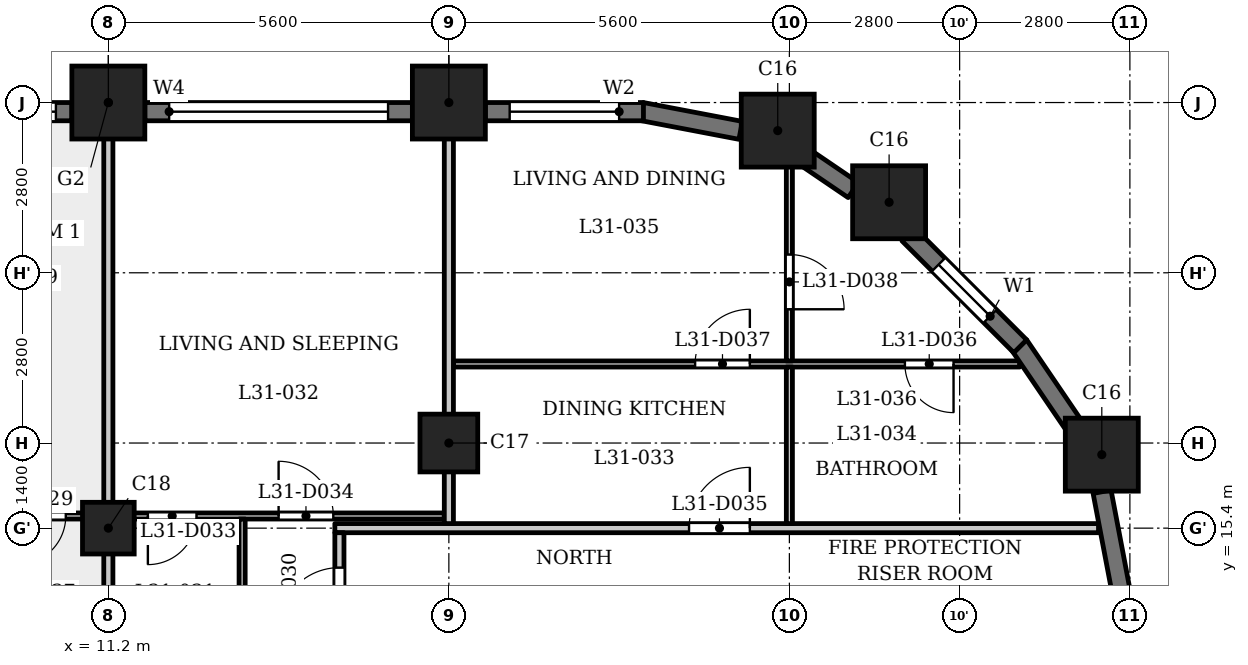
"""IFC4 building model, lengths in metres.
Left out: names, types, materials, properties, quantities, classifications, styles, units other than length and angle.
Written with IfcOpenShell. Run it as: python <this file> out.ifc"""

import sys

from ifc_helpers import new_model, si_unit, direction, frame, frame_2d, origin, origin_2d, place, context, subcontext, project, spatial, rectangle, extrude, element, fill, save


model = new_model("IFC4")
c1 = context("Model", 3, precision=1e-05, world=origin(), true_north=direction((0.0, 1.0)))
c2 = subcontext(c1, "Body", "Model", "MODEL_VIEW")
j1 = project(units=[si_unit("LENGTHUNIT", "METRE"), si_unit("PLANEANGLEUNIT", "RADIAN")], contexts=[c1])
p1 = place(None, origin())
s1 = spatial("IfcSite", under=j1, at=p1, CompositionType="ELEMENT")
p2 = place(p1, origin())
s2 = spatial("IfcBuilding", under=s1, at=p2, CompositionType="ELEMENT")
p3 = place(p2, frame((0.0, 0.0, 121.8)))
s3 = spatial("IfcBuildingStorey", under=s2, at=p3, CompositionType="ELEMENT", Elevation=121.8)
for number, where, z_axis, x_axis in (
    (1, (27.538, 16.609, 0.0), (0.0, 0.0, 1.0), (1.0, 0.0, 0.0)),
    (2, (24.04, 20.76, 0.0), (0.0, 0.0, 1.0), (1.0, 0.0, 0.0)),
    (3, (22.209, 21.938, 0.0), (0.0, 0.0, 1.0), (1.0, 0.0, 0.0)),
    (4, (16.8, 22.4, 0.0), (0.0, 0.0, 1.0), (1.0, 0.0, 0.0)),
    (5, (11.2, 22.4, 0.0), (0.0, 0.0, 1.0), (1.0, 0.0, 0.0)),
):
    element("IfcColumn", number, at=place(p3, frame(where, z_axis=z_axis, x_axis=x_axis)), inside=s3, PredefinedType="COLUMN", context=c2, shape_type="SweptSolid", body=[
        extrude(rectangle(XDim=1.2, YDim=1.2, at=origin_2d()), origin(), (0.0, 0.0, 1.0), 3.5),
    ])
p4 = place(p3, frame((16.8, 16.8, 0.0), z_axis=(0.0, 0.0, 1.0), x_axis=(1.0, 0.0, 0.0)))
e6 = element("IfcColumn", 6, at=p4, inside=s3, PredefinedType="COLUMN", context=c2, shape_type="SweptSolid", body=[
    extrude(rectangle(XDim=0.95, YDim=0.95, at=origin_2d()), origin(), (0.0, 0.0, 1.0), 3.5),
])
p5 = place(p3, frame((11.2, 15.4, 0.0), z_axis=(0.0, 0.0, 1.0), x_axis=(1.0, 0.0, 0.0)))
e7 = element("IfcColumn", 7, at=p5, inside=s3, PredefinedType="COLUMN", context=c2, shape_type="SweptSolid", body=[
    extrude(rectangle(XDim=0.85, YDim=0.85, at=origin_2d()), origin(), (0.0, 0.0, 1.0), 3.5),
])
for number, where, z_axis, x_axis in (
    (8, (27.853, 14.372, 0.0), (0.0, 0.0, 1.0), (-0.187, 0.982, 0.0)),
    (9, (27.11, 17.043, 0.0), (0.0, 0.0, 1.0), (-0.562, 0.827, 0.0)),
):
    element("IfcWall", number, at=place(p3, frame(where, z_axis=z_axis, x_axis=x_axis)), inside=s3, PredefinedType="SOLIDWALL", context=c2, shape_type="SweptSolid", body=[
        extrude(rectangle(XDim=1.656, YDim=0.3, at=frame_2d((0.828, 0.0))), origin(), (0.0, 0.0, 1.0), 2.35),
    ])
p6 = place(p3, frame((26.197, 18.391, 0.0), z_axis=(0.0, 0.0, 1.0), x_axis=(-0.707059830104, 0.707153729152, 0.0)))
e10 = element("IfcWall", 10, at=p6, inside=s3, PredefinedType="SOLIDWALL", context=c2, shape_type="SweptSolid", body=[
    extrude(rectangle(XDim=2.6, YDim=0.3, at=frame_2d((1.3, 0.0))), origin(), (0.0, 0.0, 1.0), 2.35),
])
p7 = place(p6, frame((0.7, 0.0, 0.6)))
e11 = element("IfcOpeningElement", 11, at=p7, cuts=e10, PredefinedType="OPENING", context=c2, shape_type="SweptSolid", body=[
    extrude(rectangle(XDim=1.2, YDim=1.55, at=frame_2d((0.6, 0.775))), frame((0.0, 0.16, 0.0), z_axis=(0.0, -1.0, 0.0), x_axis=(1.0, 0.0, 0.0)), (0.0, 0.0, 1.0), 0.32),
])
p8 = place(p3, frame((23.451, 20.96, 0.0), z_axis=(0.0, 0.0, 1.0), x_axis=(-0.827019434577, 0.562173331661, 0.0)))
e12 = element("IfcWall", 12, at=p8, inside=s3, PredefinedType="SOLIDWALL", context=c2, shape_type="SweptSolid", body=[
    extrude(rectangle(XDim=0.977, YDim=0.3, at=frame_2d((0.489, 0.0))), origin(), (0.0, 0.0, 1.0), 3.15),
])
p9 = place(p3, frame((21.599, 21.942, 0.0), z_axis=(0.0, 0.0, 1.0), x_axis=(-0.98228820662, 0.187376303559, 0.0)))
e13 = element("IfcWall", 13, at=p9, inside=s3, PredefinedType="SOLIDWALL", context=c2, shape_type="SweptSolid", body=[
    extrude(rectangle(XDim=1.656, YDim=0.3, at=frame_2d((0.828, 0.0))), origin(), (0.0, 0.0, 1.0), 2.35),
])
p10 = place(p3, frame((20.0, 22.25, 0.0), z_axis=(0.0, 0.0, 1.0), x_axis=(-1.0, 0.0, 0.0)))
e14 = element("IfcWall", 14, at=p10, inside=s3, PredefinedType="SOLIDWALL", context=c2, shape_type="SweptSolid", body=[
    extrude(rectangle(XDim=2.6, YDim=0.3, at=frame_2d((1.3, 0.0))), origin(), (0.0, 0.0, 1.0), 2.35),
])
p11 = place(p10, frame((0.4, 0.0, 0.9)))
e15 = element("IfcOpeningElement", 15, at=p11, cuts=e14, PredefinedType="OPENING", context=c2, shape_type="SweptSolid", body=[
    extrude(rectangle(XDim=1.8, YDim=1.25, at=frame_2d((0.9, 0.625))), frame((0.0, 0.16, 0.0), z_axis=(0.0, -1.0, 0.0), x_axis=(1.0, 0.0, 0.0)), (0.0, 0.0, 1.0), 0.32),
])
p12 = place(p3, frame((16.2, 22.25, 0.0), z_axis=(0.0, 0.0, 1.0), x_axis=(-1.0, 0.0, 0.0)))
e16 = element("IfcWall", 16, at=p12, inside=s3, PredefinedType="SOLIDWALL", context=c2, shape_type="SweptSolid", body=[
    extrude(rectangle(XDim=4.4, YDim=0.3, at=frame_2d((2.2, 0.0))), origin(), (0.0, 0.0, 1.0), 2.35),
])
p13 = place(p12, frame((0.4, 0.0, 1.2)))
e17 = element("IfcOpeningElement", 17, at=p13, cuts=e16, PredefinedType="OPENING", context=c2, shape_type="SweptSolid", body=[
    extrude(rectangle(XDim=3.6, YDim=0.95, at=frame_2d((1.8, 0.475))), frame((0.0, 0.16, 0.0), z_axis=(0.0, -1.0, 0.0), x_axis=(1.0, 0.0, 0.0)), (0.0, 0.0, 1.0), 0.32),
])
p14 = place(p3, frame((10.6, 22.25, 0.0), z_axis=(0.0, 0.0, 1.0), x_axis=(-1.0, 0.0, 0.0)))
e18 = element("IfcWall", 18, at=p14, inside=s3, PredefinedType="SOLIDWALL", context=c2, shape_type="SweptSolid", body=[
    extrude(rectangle(XDim=4.4, YDim=0.3, at=frame_2d((2.2, 0.0))), origin(), (0.0, 0.0, 1.0), 2.35),
])
p15 = place(p14, frame((0.262, 0.0, 0.9)))
e19 = element("IfcOpeningElement", 19, at=p15, cuts=e18, PredefinedType="OPENING", context=c2, shape_type="SweptSolid", body=[
    extrude(rectangle(XDim=1.8, YDim=1.25, at=frame_2d((0.9, 0.625))), frame((0.0, 0.16, 0.0), z_axis=(0.0, -1.0, 0.0), x_axis=(1.0, 0.0, 0.0)), (0.0, 0.0, 1.0), 0.32),
])
p16 = place(p14, frame((2.837, 0.0, 0.6)))
e20 = element("IfcOpeningElement", 20, at=p16, cuts=e18, PredefinedType="OPENING", context=c2, shape_type="SweptSolid", body=[
    extrude(rectangle(XDim=1.2, YDim=1.55, at=frame_2d((0.6, 0.775))), frame((0.0, 0.16, 0.0), z_axis=(0.0, -1.0, 0.0), x_axis=(1.0, 0.0, 0.0)), (0.0, 0.0, 1.0), 0.32),
])
p17 = place(p3, frame((14.925, 15.4, 0.0), z_axis=(0.0, 0.0, 1.0), x_axis=(1.0, 0.0, 0.0)))
e21 = element("IfcWall", 21, at=p17, inside=s3, PredefinedType="PARTITIONING", context=c2, shape_type="SweptSolid", body=[
    extrude(rectangle(XDim=12.559, YDim=0.15, at=frame_2d((6.279, 0.0))), origin(), (0.0, 0.0, 1.0), 3.15),
])
p18 = place(p17, frame((5.825, 0.0, 0.0)))
e22 = element("IfcOpeningElement", 22, at=p18, cuts=e21, PredefinedType="OPENING", context=c2, shape_type="SweptSolid", body=[
    extrude(rectangle(XDim=1.0, YDim=2.1, at=frame_2d((0.5, 1.05))), frame((0.0, 0.085, 0.0), z_axis=(0.0, -1.0, 0.0), x_axis=(1.0, 0.0, 0.0)), (0.0, 0.0, 1.0), 0.17),
])
p19 = place(p3, frame((-16.725, 15.6, 0.0), z_axis=(0.0, 0.0, 1.0), x_axis=(1.0, 0.0, 0.0)))
e23 = element("IfcWall", 23, at=p19, inside=s3, PredefinedType="PARTITIONING", context=c2, shape_type="SweptSolid", body=[
    extrude(rectangle(XDim=33.45, YDim=0.1, at=frame_2d((16.725, 0.0))), origin(), (0.0, 0.0, 1.0), 3.15),
])
p20 = place(p19, frame((9.425, 0.0, 0.0)))
e24 = element("IfcOpeningElement", 24, at=p20, cuts=e23, PredefinedType="OPENING", context=c2, shape_type="SweptSolid", body=[
    extrude(rectangle(XDim=0.8, YDim=2.1, at=frame_2d((0.4, 1.05))), frame((0.0, 0.06, 0.0), z_axis=(0.0, -1.0, 0.0), x_axis=(1.0, 0.0, 0.0)), (0.0, 0.0, 1.0), 0.12),
])
p21 = place(p19, frame((6.975, 0.0, 0.0)))
e25 = element("IfcOpeningElement", 25, at=p21, cuts=e23, PredefinedType="OPENING", context=c2, shape_type="SweptSolid", body=[
    extrude(rectangle(XDim=0.9, YDim=2.1, at=frame_2d((0.45, 1.05))), frame((0.0, 0.06, 0.0), z_axis=(0.0, -1.0, 0.0), x_axis=(1.0, 0.0, 0.0)), (0.0, 0.0, 1.0), 0.12),
])
p22 = place(p19, frame((1.875, 0.0, 0.0)))
e26 = element("IfcOpeningElement", 26, at=p22, cuts=e23, PredefinedType="OPENING", context=c2, shape_type="SweptSolid", body=[
    extrude(rectangle(XDim=0.9, YDim=2.1, at=frame_2d((0.45, 1.05))), frame((0.0, 0.06, 0.0), z_axis=(0.0, -1.0, 0.0), x_axis=(1.0, 0.0, 0.0)), (0.0, 0.0, 1.0), 0.12),
])
p23 = place(p19, frame((3.475, 0.0, 0.0)))
e27 = element("IfcOpeningElement", 27, at=p23, cuts=e23, PredefinedType="OPENING", context=c2, shape_type="SweptSolid", body=[
    extrude(rectangle(XDim=0.9, YDim=2.1, at=frame_2d((0.45, 1.05))), frame((0.0, 0.06, 0.0), z_axis=(0.0, -1.0, 0.0), x_axis=(1.0, 0.0, 0.0)), (0.0, 0.0, 1.0), 0.12),
])
p24 = place(p19, frame((11.775, 0.0, 0.0)))
e28 = element("IfcOpeningElement", 28, at=p24, cuts=e23, PredefinedType="OPENING", context=c2, shape_type="SweptSolid", body=[
    extrude(rectangle(XDim=0.8, YDim=2.1, at=frame_2d((0.4, 1.05))), frame((0.0, 0.06, 0.0), z_axis=(0.0, -1.0, 0.0), x_axis=(1.0, 0.0, 0.0)), (0.0, 0.0, 1.0), 0.12),
])
p25 = place(p19, frame((14.175, 0.0, 0.0)))
e29 = element("IfcOpeningElement", 29, at=p25, cuts=e23, PredefinedType="OPENING", context=c2, shape_type="SweptSolid", body=[
    extrude(rectangle(XDim=0.9, YDim=2.1, at=frame_2d((0.45, 1.05))), frame((0.0, 0.06, 0.0), z_axis=(0.0, -1.0, 0.0), x_axis=(1.0, 0.0, 0.0)), (0.0, 0.0, 1.0), 0.12),
])
p26 = place(p19, frame((20.725, 0.0, 0.0)))
e30 = element("IfcOpeningElement", 30, at=p26, cuts=e23, PredefinedType="OPENING", context=c2, shape_type="SweptSolid", body=[
    extrude(rectangle(XDim=0.8, YDim=2.1, at=frame_2d((0.4, 1.05))), frame((0.0, 0.06, 0.0), z_axis=(0.0, -1.0, 0.0), x_axis=(1.0, 0.0, 0.0)), (0.0, 0.0, 1.0), 0.12),
])
p27 = place(p19, frame((18.375, 0.0, 0.0)))
e31 = element("IfcOpeningElement", 31, at=p27, cuts=e23, PredefinedType="OPENING", context=c2, shape_type="SweptSolid", body=[
    extrude(rectangle(XDim=0.9, YDim=2.1, at=frame_2d((0.45, 1.05))), frame((0.0, 0.06, 0.0), z_axis=(0.0, -1.0, 0.0), x_axis=(1.0, 0.0, 0.0)), (0.0, 0.0, 1.0), 0.12),
])
p28 = place(p19, frame((26.425, 0.0, 0.0)))
e32 = element("IfcOpeningElement", 32, at=p28, cuts=e23, PredefinedType="OPENING", context=c2, shape_type="SweptSolid", body=[
    extrude(rectangle(XDim=0.8, YDim=2.1, at=frame_2d((0.4, 1.05))), frame((0.0, 0.06, 0.0), z_axis=(0.0, -1.0, 0.0), x_axis=(1.0, 0.0, 0.0)), (0.0, 0.0, 1.0), 0.12),
])
p29 = place(p19, frame((23.875, 0.0, 0.0)))
e33 = element("IfcOpeningElement", 33, at=p29, cuts=e23, PredefinedType="OPENING", context=c2, shape_type="SweptSolid", body=[
    extrude(rectangle(XDim=0.9, YDim=2.1, at=frame_2d((0.45, 1.05))), frame((0.0, 0.06, 0.0), z_axis=(0.0, -1.0, 0.0), x_axis=(1.0, 0.0, 0.0)), (0.0, 0.0, 1.0), 0.12),
])
p30 = place(p19, frame((28.575, 0.0, 0.0)))
e34 = element("IfcOpeningElement", 34, at=p30, cuts=e23, PredefinedType="OPENING", context=c2, shape_type="SweptSolid", body=[
    extrude(rectangle(XDim=0.8, YDim=2.1, at=frame_2d((0.4, 1.05))), frame((0.0, 0.06, 0.0), z_axis=(0.0, -1.0, 0.0), x_axis=(1.0, 0.0, 0.0)), (0.0, 0.0, 1.0), 0.12),
])
p31 = place(p19, frame((30.725, 0.0, 0.0)))
e35 = element("IfcOpeningElement", 35, at=p31, cuts=e23, PredefinedType="OPENING", context=c2, shape_type="SweptSolid", body=[
    extrude(rectangle(XDim=0.9, YDim=2.1, at=frame_2d((0.45, 1.05))), frame((0.0, 0.06, 0.0), z_axis=(0.0, -1.0, 0.0), x_axis=(1.0, 0.0, 0.0)), (0.0, 0.0, 1.0), 0.12),
])
p32 = place(p3, frame((16.875, 18.1, 0.0), z_axis=(0.0, 0.0, 1.0), x_axis=(1.0, 0.0, 0.0)))
e36 = element("IfcWall", 36, at=p32, inside=s3, PredefinedType="PARTITIONING", context=c2, shape_type="SweptSolid", body=[
    extrude(rectangle(XDim=9.315, YDim=0.1, at=frame_2d((4.658, 0.0))), origin(), (0.0, 0.0, 1.0), 3.15),
])
p33 = place(p32, frame((7.425, 0.0, 0.0)))
e37 = element("IfcOpeningElement", 37, at=p33, cuts=e36, PredefinedType="OPENING", context=c2, shape_type="SweptSolid", body=[
    extrude(rectangle(XDim=0.8, YDim=2.1, at=frame_2d((0.4, 1.05))), frame((0.0, 0.06, 0.0), z_axis=(0.0, -1.0, 0.0), x_axis=(1.0, 0.0, 0.0)), (0.0, 0.0, 1.0), 0.12),
])
p34 = place(p32, frame((3.975, 0.0, 0.0)))
e38 = element("IfcOpeningElement", 38, at=p34, cuts=e36, PredefinedType="OPENING", context=c2, shape_type="SweptSolid", body=[
    extrude(rectangle(XDim=0.9, YDim=2.1, at=frame_2d((0.45, 1.05))), frame((0.0, 0.06, 0.0), z_axis=(0.0, -1.0, 0.0), x_axis=(1.0, 0.0, 0.0)), (0.0, 0.0, 1.0), 0.12),
])
p35 = place(p3, frame((11.2, 13.275, 0.0), z_axis=(0.0, 0.0, 1.0), x_axis=(0.0, 1.0, 0.0)))
e39 = element("IfcWall", 39, at=p35, inside=s3, PredefinedType="PARTITIONING", context=c2, shape_type="SweptSolid", body=[
    extrude(rectangle(XDim=2.275, YDim=0.15, at=frame_2d((1.138, 0.0))), origin(), (0.0, 0.0, 1.0), 3.15),
])
p36 = place(p3, frame((11.2, 15.65, 0.0), z_axis=(0.0, 0.0, 1.0), x_axis=(0.0, 1.0, 0.0)))
e40 = element("IfcWall", 40, at=p36, inside=s3, PredefinedType="PARTITIONING", context=c2, shape_type="SweptSolid", body=[
    extrude(rectangle(XDim=7.33, YDim=0.15, at=frame_2d((3.665, 0.0))), origin(), (0.0, 0.0, 1.0), 3.15),
])
p37 = place(p3, frame((13.4, 13.275, 0.0), z_axis=(0.0, 0.0, 1.0), x_axis=(0.0, 1.0, 0.0)))
e41 = element("IfcWall", 41, at=p37, inside=s3, PredefinedType="PARTITIONING", context=c2, shape_type="SweptSolid", body=[
    extrude(rectangle(XDim=2.275, YDim=0.1, at=frame_2d((1.138, 0.0))), origin(), (0.0, 0.0, 1.0), 3.15),
])
p38 = place(p3, frame((15.0, 13.275, 0.0), z_axis=(0.0, 0.0, 1.0), x_axis=(0.0, 1.0, 0.0)))
e42 = element("IfcWall", 42, at=p38, inside=s3, PredefinedType="PARTITIONING", context=c2, shape_type="SweptSolid", body=[
    extrude(rectangle(XDim=2.05, YDim=0.15, at=frame_2d((1.025, 0.0))), origin(), (0.0, 0.0, 1.0), 3.15),
])
p39 = place(p38, frame((0.476, 0.0, 0.0)))
e43 = element("IfcOpeningElement", 43, at=p39, cuts=e42, PredefinedType="OPENING", context=c2, shape_type="SweptSolid", body=[
    extrude(rectangle(XDim=1.0, YDim=2.1, at=frame_2d((0.5, 1.05))), frame((0.0, 0.085, 0.0), z_axis=(0.0, -1.0, 0.0), x_axis=(1.0, 0.0, 0.0)), (0.0, 0.0, 1.0), 0.17),
])
p40 = place(p3, frame((16.8, 15.475, 0.0), z_axis=(0.0, 0.0, 1.0), x_axis=(0.0, 1.0, 0.0)))
e44 = element("IfcWall", 44, at=p40, inside=s3, PredefinedType="PARTITIONING", context=c2, shape_type="SweptSolid", body=[
    extrude(rectangle(XDim=7.505, YDim=0.15, at=frame_2d((3.752, 0.0))), origin(), (0.0, 0.0, 1.0), 3.15),
])
p41 = place(p3, frame((22.4, 15.475, 0.0), z_axis=(0.0, 0.0, 1.0), x_axis=(0.0, 1.0, 0.0)))
e45 = element("IfcWall", 45, at=p41, inside=s3, PredefinedType="PARTITIONING", context=c2, shape_type="SweptSolid", body=[
    extrude(rectangle(XDim=2.575, YDim=0.1, at=frame_2d((1.288, 0.0))), origin(), (0.0, 0.0, 1.0), 3.15),
])
p42 = place(p3, frame((22.4, 18.15, 0.0), z_axis=(0.0, 0.0, 1.0), x_axis=(0.0, 1.0, 0.0)))
e46 = element("IfcWall", 46, at=p42, inside=s3, PredefinedType="PARTITIONING", context=c2, shape_type="SweptSolid", body=[
    extrude(rectangle(XDim=3.57, YDim=0.1, at=frame_2d((1.785, 0.0))), origin(), (0.0, 0.0, 1.0), 3.15),
])
p43 = place(p42, frame((0.85, 0.0, 0.0)))
e47 = element("IfcOpeningElement", 47, at=p43, cuts=e46, PredefinedType="OPENING", context=c2, shape_type="SweptSolid", body=[
    extrude(rectangle(XDim=0.9, YDim=2.1, at=frame_2d((0.45, 1.05))), frame((0.0, 0.06, 0.0), z_axis=(0.0, -1.0, 0.0), x_axis=(1.0, 0.0, 0.0)), (0.0, 0.0, 1.0), 0.12),
])
p44 = place(p28, origin())
e48 = element("IfcDoor", 48, at=p44, inside=s3, OperationType="SINGLE_SWING_LEFT", PredefinedType="DOOR", context=c2, shape_type="SweptSolid", body=[
    extrude(rectangle(XDim=0.8, YDim=2.1, at=frame_2d((0.4, 1.05))), frame((0.0, 0.025, 0.0), z_axis=(0.0, -1.0, 0.0), x_axis=(1.0, 0.0, 0.0)), (0.0, 0.0, 1.0), 0.05),
])
fill(e32, e48)
p45 = place(p39, origin())
e49 = element("IfcDoor", 49, at=p45, inside=s3, OperationType="SINGLE_SWING_RIGHT", PredefinedType="DOOR", context=c2, shape_type="SweptSolid", body=[
    extrude(rectangle(XDim=1.0, YDim=2.1, at=frame_2d((0.5, 1.05))), frame((0.0, 0.025, 0.0), z_axis=(0.0, -1.0, 0.0), x_axis=(1.0, 0.0, 0.0)), (0.0, 0.0, 1.0), 0.05),
])
fill(e43, e49)
p46 = place(p30, origin())
e50 = element("IfcDoor", 50, at=p46, inside=s3, OperationType="SINGLE_SWING_LEFT", PredefinedType="DOOR", context=c2, shape_type="SweptSolid", body=[
    extrude(rectangle(XDim=0.8, YDim=2.1, at=frame_2d((0.4, 1.05))), frame((0.0, 0.025, 0.0), z_axis=(0.0, -1.0, 0.0), x_axis=(1.0, 0.0, 0.0)), (0.0, 0.0, 1.0), 0.05),
])
fill(e34, e50)
p47 = place(p31, origin())
e51 = element("IfcDoor", 51, at=p47, inside=s3, OperationType="SINGLE_SWING_RIGHT", PredefinedType="DOOR", context=c2, shape_type="SweptSolid", body=[
    extrude(rectangle(XDim=0.9, YDim=2.1, at=frame_2d((0.45, 1.05))), frame((0.0, 0.025, 0.0), z_axis=(0.0, -1.0, 0.0), x_axis=(1.0, 0.0, 0.0)), (0.0, 0.0, 1.0), 0.05),
])
fill(e35, e51)
p48 = place(p18, origin())
e52 = element("IfcDoor", 52, at=p48, inside=s3, OperationType="SINGLE_SWING_LEFT", PredefinedType="DOOR", context=c2, shape_type="SweptSolid", body=[
    extrude(rectangle(XDim=1.0, YDim=2.1, at=frame_2d((0.5, 1.05))), frame((0.0, 0.025, 0.0), z_axis=(0.0, -1.0, 0.0), x_axis=(1.0, 0.0, 0.0)), (0.0, 0.0, 1.0), 0.05),
])
fill(e22, e52)
p49 = place(p33, origin())
e53 = element("IfcDoor", 53, at=p49, inside=s3, OperationType="SINGLE_SWING_RIGHT", PredefinedType="DOOR", context=c2, shape_type="SweptSolid", body=[
    extrude(rectangle(XDim=0.8, YDim=2.1, at=frame_2d((0.4, 1.05))), frame((0.0, 0.025, 0.0), z_axis=(0.0, -1.0, 0.0), x_axis=(1.0, 0.0, 0.0)), (0.0, 0.0, 1.0), 0.05),
])
fill(e37, e53)
p50 = place(p34, origin())
e54 = element("IfcDoor", 54, at=p50, inside=s3, OperationType="SINGLE_SWING_LEFT", PredefinedType="DOOR", context=c2, shape_type="SweptSolid", body=[
    extrude(rectangle(XDim=0.9, YDim=2.1, at=frame_2d((0.45, 1.05))), frame((0.0, 0.025, 0.0), z_axis=(0.0, -1.0, 0.0), x_axis=(1.0, 0.0, 0.0)), (0.0, 0.0, 1.0), 0.05),
])
fill(e38, e54)
p51 = place(p43, origin())
e55 = element("IfcDoor", 55, at=p51, inside=s3, OperationType="SINGLE_SWING_LEFT", PredefinedType="DOOR", context=c2, shape_type="SweptSolid", body=[
    extrude(rectangle(XDim=0.9, YDim=2.1, at=frame_2d((0.45, 1.05))), frame((0.0, 0.025, 0.0), z_axis=(0.0, -1.0, 0.0), x_axis=(1.0, 0.0, 0.0)), (0.0, 0.0, 1.0), 0.05),
])
fill(e47, e55)
p52 = place(p7, origin())
e56 = element("IfcWindow", 56, at=p52, inside=s3, PartitioningType="SINGLE_PANEL", PredefinedType="WINDOW", context=c2, shape_type="SweptSolid", body=[
    extrude(rectangle(XDim=1.2, YDim=1.55, at=frame_2d((0.6, 0.775))), frame((0.0, 0.03, 0.0), z_axis=(0.0, -1.0, 0.0), x_axis=(1.0, 0.0, 0.0)), (0.0, 0.0, 1.0), 0.06),
])
fill(e11, e56)
p53 = place(p11, origin())
e57 = element("IfcWindow", 57, at=p53, inside=s3, PartitioningType="SINGLE_PANEL", PredefinedType="WINDOW", context=c2, shape_type="SweptSolid", body=[
    extrude(rectangle(XDim=1.8, YDim=1.25, at=frame_2d((0.9, 0.625))), frame((0.0, 0.03, 0.0), z_axis=(0.0, -1.0, 0.0), x_axis=(1.0, 0.0, 0.0)), (0.0, 0.0, 1.0), 0.06),
])
fill(e15, e57)
p54 = place(p13, origin())
e58 = element("IfcWindow", 58, at=p54, inside=s3, PartitioningType="SINGLE_PANEL", PredefinedType="WINDOW", context=c2, shape_type="SweptSolid", body=[
    extrude(rectangle(XDim=3.6, YDim=0.95, at=frame_2d((1.8, 0.475))), frame((0.0, 0.03, 0.0), z_axis=(0.0, -1.0, 0.0), x_axis=(1.0, 0.0, 0.0)), (0.0, 0.0, 1.0), 0.06),
])
fill(e17, e58)
p55 = place(p15, origin())
e59 = element("IfcWindow", 59, at=p55, inside=s3, PartitioningType="SINGLE_PANEL", PredefinedType="WINDOW", context=c2, shape_type="SweptSolid", body=[
    extrude(rectangle(XDim=1.8, YDim=1.25, at=frame_2d((0.9, 0.625))), frame((0.0, 0.03, 0.0), z_axis=(0.0, -1.0, 0.0), x_axis=(1.0, 0.0, 0.0)), (0.0, 0.0, 1.0), 0.06),
])
fill(e19, e59)
save(model, sys.argv[1])
